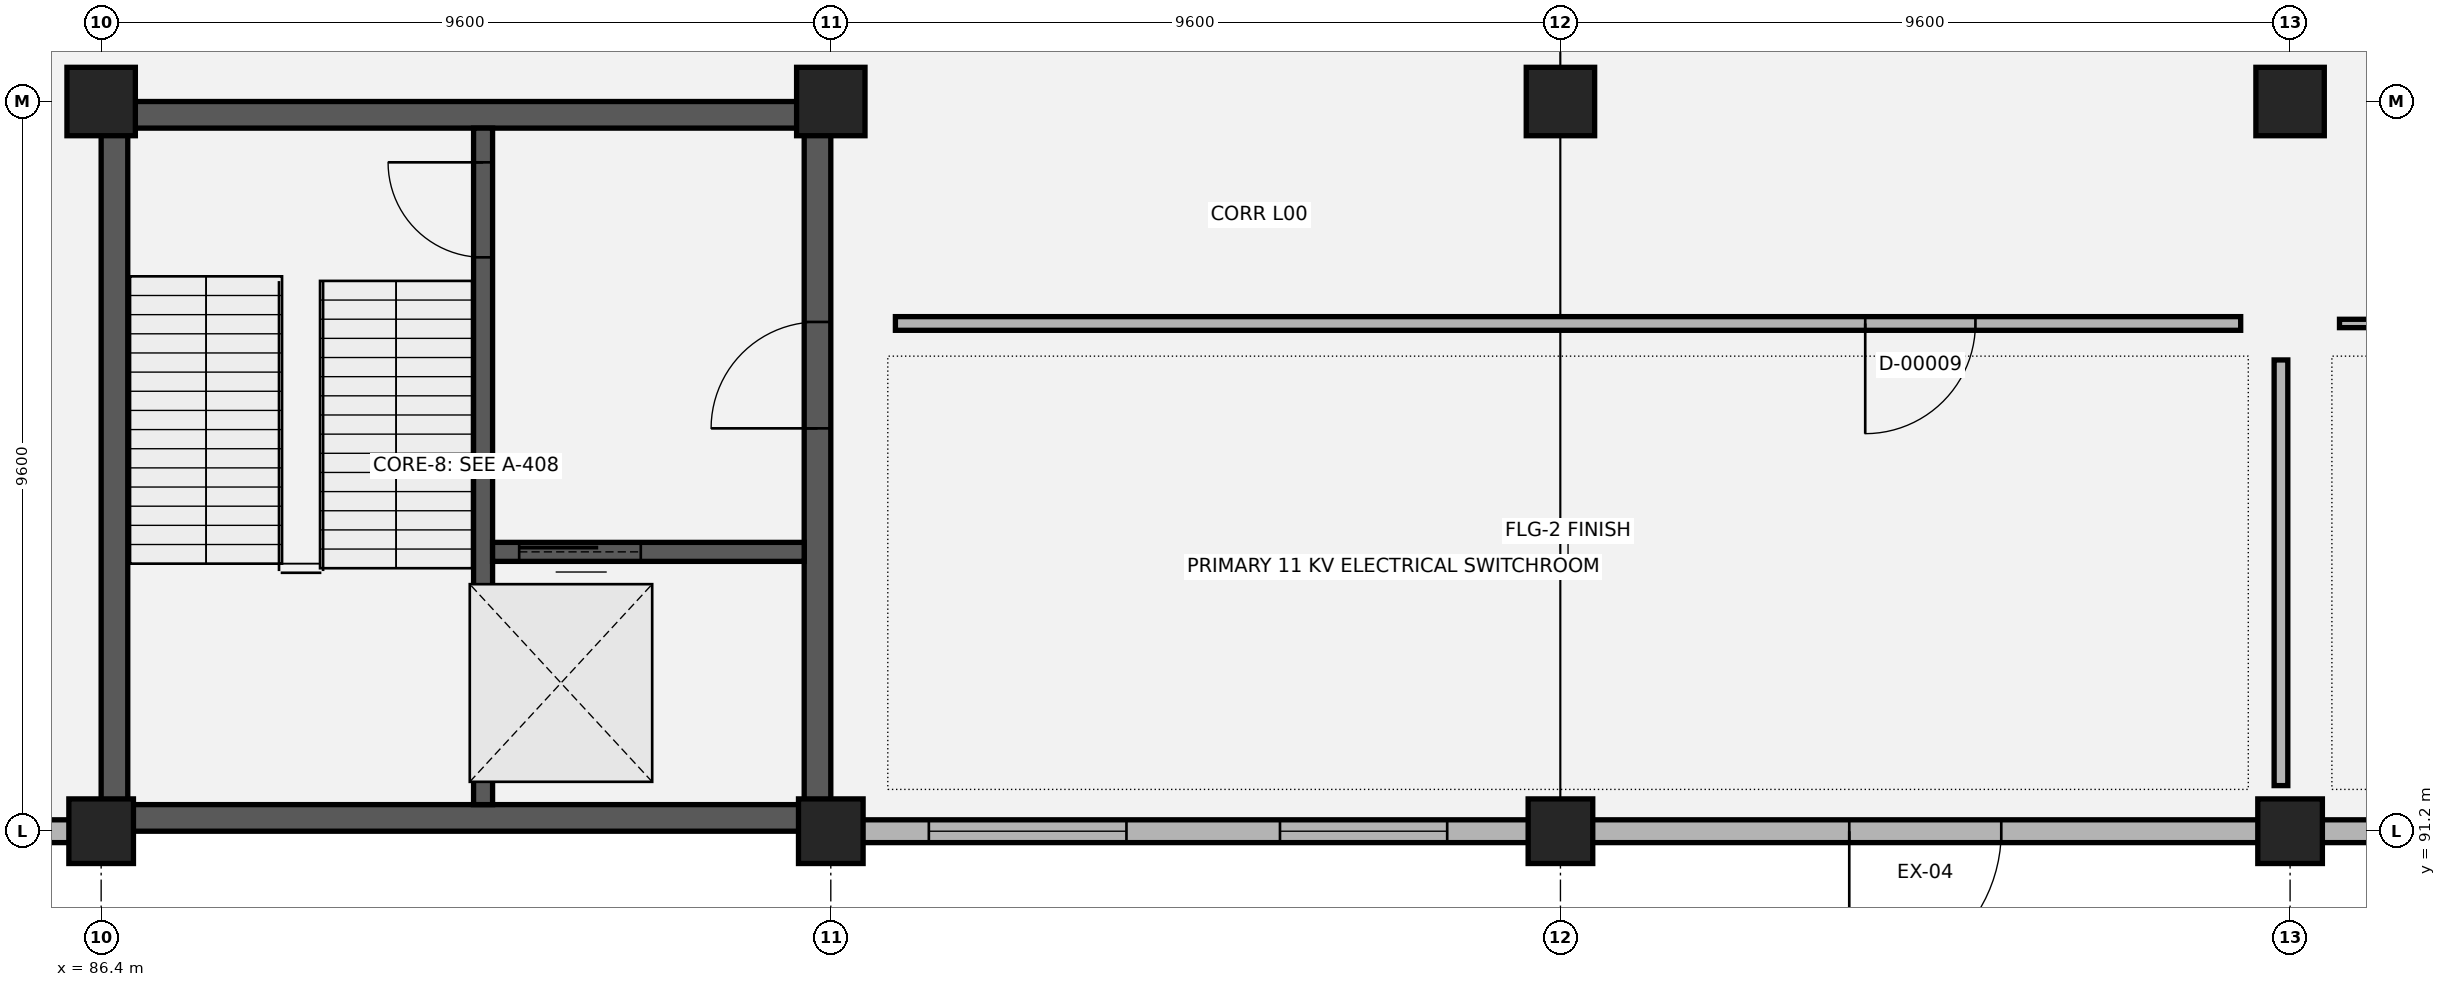
"""IFC4 building model, lengths in metres.
Left out: names, types, materials, properties, quantities, classifications, styles, units other than length and angle.
Written with IfcOpenShell. Run it as: python <this file> out.ifc"""

import sys

from ifc_helpers import new_model, si_unit, direction, frame, frame_2d, origin, origin_2d, place, context, subcontext, project, spatial, rectangle, extrude, element, fill, save


model = new_model("IFC4")
c1 = context("Model", 3, precision=1e-05, world=origin(), true_north=direction((0.0, 1.0)))
c2 = subcontext(c1, "Body", "Model", "MODEL_VIEW")
j1 = project(units=[si_unit("LENGTHUNIT", "METRE"), si_unit("PLANEANGLEUNIT", "RADIAN")], contexts=[c1])
p1 = place(None, origin())
s1 = spatial("IfcSite", under=j1, at=p1, CompositionType="ELEMENT")
p2 = place(p1, origin())
s2 = spatial("IfcBuilding", under=s1, at=p2, CompositionType="ELEMENT")
p3 = place(p2, origin())
s3 = spatial("IfcBuildingStorey", under=s2, at=p3, CompositionType="ELEMENT", Elevation=0.0)
p4 = place(p3, frame((86.4, 91.2, 0.0), z_axis=(0.0, 0.0, 1.0), x_axis=(1.0, 0.0, 0.0)))
e1 = element("IfcColumn", 1, at=p4, inside=s3, PredefinedType="COLUMN", context=c2, shape_type="SweptSolid", body=[
    extrude(rectangle(XDim=0.85, YDim=0.85, at=origin_2d()), origin(), (0.0, 0.0, 1.0), 5.4),
])
p5 = place(p3, frame((86.4, 100.8, 0.0), z_axis=(0.0, 0.0, 1.0), x_axis=(1.0, 0.0, 0.0)))
e2 = element("IfcColumn", 2, at=p5, inside=s3, PredefinedType="COLUMN", context=c2, shape_type="SweptSolid", body=[
    extrude(rectangle(XDim=0.9, YDim=0.9, at=origin_2d()), origin(), (0.0, 0.0, 1.0), 5.4),
])
p6 = place(p3, frame((96.0, 91.2, 0.0), z_axis=(0.0, 0.0, 1.0), x_axis=(1.0, 0.0, 0.0)))
e3 = element("IfcColumn", 3, at=p6, inside=s3, PredefinedType="COLUMN", context=c2, shape_type="SweptSolid", body=[
    extrude(rectangle(XDim=0.85, YDim=0.85, at=origin_2d()), origin(), (0.0, 0.0, 1.0), 5.4),
])
p7 = place(p3, frame((96.0, 100.8, 0.0), z_axis=(0.0, 0.0, 1.0), x_axis=(1.0, 0.0, 0.0)))
e4 = element("IfcColumn", 4, at=p7, inside=s3, PredefinedType="COLUMN", context=c2, shape_type="SweptSolid", body=[
    extrude(rectangle(XDim=0.9, YDim=0.9, at=origin_2d()), origin(), (0.0, 0.0, 1.0), 5.4),
])
p8 = place(p3, frame((105.6, 91.2, 0.0), z_axis=(0.0, 0.0, 1.0), x_axis=(1.0, 0.0, 0.0)))
e5 = element("IfcColumn", 5, at=p8, inside=s3, PredefinedType="COLUMN", context=c2, shape_type="SweptSolid", body=[
    extrude(rectangle(XDim=0.85, YDim=0.85, at=origin_2d()), origin(), (0.0, 0.0, 1.0), 5.4),
])
p9 = place(p3, frame((105.6, 100.8, 0.0), z_axis=(0.0, 0.0, 1.0), x_axis=(1.0, 0.0, 0.0)))
e6 = element("IfcColumn", 6, at=p9, inside=s3, PredefinedType="COLUMN", context=c2, shape_type="SweptSolid", body=[
    extrude(rectangle(XDim=0.9, YDim=0.9, at=origin_2d()), origin(), (0.0, 0.0, 1.0), 5.4),
])
p10 = place(p3, frame((115.2, 91.2, 0.0), z_axis=(0.0, 0.0, 1.0), x_axis=(1.0, 0.0, 0.0)))
e7 = element("IfcColumn", 7, at=p10, inside=s3, PredefinedType="COLUMN", context=c2, shape_type="SweptSolid", body=[
    extrude(rectangle(XDim=0.85, YDim=0.85, at=origin_2d()), origin(), (0.0, 0.0, 1.0), 5.4),
])
p11 = place(p3, frame((115.2, 100.8, 0.0), z_axis=(0.0, 0.0, 1.0), x_axis=(1.0, 0.0, 0.0)))
e8 = element("IfcColumn", 8, at=p11, inside=s3, PredefinedType="COLUMN", context=c2, shape_type="SweptSolid", body=[
    extrude(rectangle(XDim=0.9, YDim=0.9, at=origin_2d()), origin(), (0.0, 0.0, 1.0), 5.4),
])
p12 = place(p3, frame((77.18, 91.2, 0.0), z_axis=(0.0, 0.0, 1.0), x_axis=(1.0, 0.0, 0.0)))
e9 = element("IfcWall", 9, at=p12, inside=s3, PredefinedType="SOLIDWALL", context=c2, shape_type="SweptSolid", body=[
    extrude(rectangle(XDim=8.84, YDim=0.3, at=frame_2d((4.42, 0.0))), origin(), (0.0, 0.0, 1.0), 4.04),
])
p13 = place(p12, frame((0.91, 0.0, 0.9)))
e10 = element("IfcOpeningElement", 10, at=p13, cuts=e9, PredefinedType="OPENING", context=c2, shape_type="SweptSolid", body=[
    extrude(rectangle(XDim=2.6, YDim=1.8, at=frame_2d((1.3, 0.9))), frame((0.0, 0.16, 0.0), z_axis=(0.0, -1.0, 0.0), x_axis=(1.0, 0.0, 0.0)), (0.0, 0.0, 1.0), 0.32),
])
p14 = place(p12, frame((5.53, 0.0, 0.9)))
e11 = element("IfcOpeningElement", 11, at=p14, cuts=e9, PredefinedType="OPENING", context=c2, shape_type="SweptSolid", body=[
    extrude(rectangle(XDim=2.2, YDim=1.8, at=frame_2d((1.1, 0.9))), frame((0.0, 0.16, 0.0), z_axis=(0.0, -1.0, 0.0), x_axis=(1.0, 0.0, 0.0)), (0.0, 0.0, 1.0), 0.32),
])
p15 = place(p3, frame((96.38, 91.2, 0.0), z_axis=(0.0, 0.0, 1.0), x_axis=(1.0, 0.0, 0.0)))
e12 = element("IfcWall", 12, at=p15, inside=s3, PredefinedType="SOLIDWALL", context=c2, shape_type="SweptSolid", body=[
    extrude(rectangle(XDim=8.84, YDim=0.3, at=frame_2d((4.42, 0.0))), origin(), (0.0, 0.0, 1.0), 4.04),
])
p16 = place(p15, frame((0.91, 0.0, 0.9)))
e13 = element("IfcOpeningElement", 13, at=p16, cuts=e12, PredefinedType="OPENING", context=c2, shape_type="SweptSolid", body=[
    extrude(rectangle(XDim=2.6, YDim=1.8, at=frame_2d((1.3, 0.9))), frame((0.0, 0.16, 0.0), z_axis=(0.0, -1.0, 0.0), x_axis=(1.0, 0.0, 0.0)), (0.0, 0.0, 1.0), 0.32),
])
p17 = place(p15, frame((5.53, 0.0, 0.9)))
e14 = element("IfcOpeningElement", 14, at=p17, cuts=e12, PredefinedType="OPENING", context=c2, shape_type="SweptSolid", body=[
    extrude(rectangle(XDim=2.2, YDim=1.8, at=frame_2d((1.1, 0.9))), frame((0.0, 0.16, 0.0), z_axis=(0.0, -1.0, 0.0), x_axis=(1.0, 0.0, 0.0)), (0.0, 0.0, 1.0), 0.32),
])
p18 = place(p3, frame((105.98, 91.2, 0.0), z_axis=(0.0, 0.0, 1.0), x_axis=(1.0, 0.0, 0.0)))
e15 = element("IfcWall", 15, at=p18, inside=s3, PredefinedType="SOLIDWALL", context=c2, shape_type="SweptSolid", body=[
    extrude(rectangle(XDim=8.84, YDim=0.3, at=frame_2d((4.42, 0.0))), origin(), (0.0, 0.0, 1.0), 4.04),
])
p19 = place(p18, frame((3.42, 0.0, 0.0)))
e16 = element("IfcOpeningElement", 16, at=p19, cuts=e15, PredefinedType="OPENING", context=c2, shape_type="SweptSolid", body=[
    extrude(rectangle(XDim=2.0, YDim=2.2, at=frame_2d((1.0, 1.1))), frame((0.0, 0.16, 0.0), z_axis=(0.0, -1.0, 0.0), x_axis=(1.0, 0.0, 0.0)), (0.0, 0.0, 1.0), 0.32),
])
p20 = place(p3, frame((115.58, 91.2, 0.0), z_axis=(0.0, 0.0, 1.0), x_axis=(1.0, 0.0, 0.0)))
e17 = element("IfcWall", 17, at=p20, inside=s3, PredefinedType="SOLIDWALL", context=c2, shape_type="SweptSolid", body=[
    extrude(rectangle(XDim=8.84, YDim=0.3, at=frame_2d((4.42, 0.0))), origin(), (0.0, 0.0, 1.0), 4.04),
])
p21 = place(p20, frame((0.91, 0.0, 0.9)))
e18 = element("IfcOpeningElement", 18, at=p21, cuts=e17, PredefinedType="OPENING", context=c2, shape_type="SweptSolid", body=[
    extrude(rectangle(XDim=2.6, YDim=1.8, at=frame_2d((1.3, 0.9))), frame((0.0, 0.16, 0.0), z_axis=(0.0, -1.0, 0.0), x_axis=(1.0, 0.0, 0.0)), (0.0, 0.0, 1.0), 0.32),
])
p22 = place(p20, frame((5.53, 0.0, 0.9)))
e19 = element("IfcOpeningElement", 19, at=p22, cuts=e17, PredefinedType="OPENING", context=c2, shape_type="SweptSolid", body=[
    extrude(rectangle(XDim=2.2, YDim=1.8, at=frame_2d((1.1, 0.9))), frame((0.0, 0.16, 0.0), z_axis=(0.0, -1.0, 0.0), x_axis=(1.0, 0.0, 0.0)), (0.0, 0.0, 1.0), 0.32),
])
for number, where, z_axis, x_axis in (
    (20, (86.4, 100.625, 0.0), (0.0, 0.0, 1.0), (1.0, 0.0, 0.0)),
    (21, (86.4, 91.375, 0.0), (0.0, 0.0, 1.0), (1.0, 0.0, 0.0)),
    (22, (86.575, 91.2, 0.0), (0.0, 0.0, 1.0), (0.0, 1.0, 0.0)),
):
    element("IfcWall", number, at=place(p3, frame(where, z_axis=z_axis, x_axis=x_axis)), inside=s3, PredefinedType="SHEAR", context=c2, shape_type="SweptSolid", body=[
        extrude(rectangle(XDim=9.6, YDim=0.35, at=frame_2d((4.8, 0.0))), origin(), (0.0, 0.0, 1.0), 5.11),
    ])
p23 = place(p3, frame((95.825, 91.2, 0.0), z_axis=(0.0, 0.0, 1.0), x_axis=(0.0, 1.0, 0.0)))
e23 = element("IfcWall", 23, at=p23, inside=s3, PredefinedType="SHEAR", context=c2, shape_type="SweptSolid", body=[
    extrude(rectangle(XDim=9.6, YDim=0.35, at=frame_2d((4.8, 0.0))), origin(), (0.0, 0.0, 1.0), 5.11),
])
p24 = place(p23, frame((5.3, 0.0, 0.0)))
e24 = element("IfcOpeningElement", 24, at=p24, cuts=e23, PredefinedType="OPENING", context=c2, shape_type="SweptSolid", body=[
    extrude(rectangle(XDim=1.4, YDim=2.15, at=frame_2d((0.7, 1.075))), frame((0.0, 0.185, 0.0), z_axis=(0.0, -1.0, 0.0), x_axis=(1.0, 0.0, 0.0)), (0.0, 0.0, 1.0), 0.37),
])
p25 = place(p3, frame((91.425, 100.45, 0.0), z_axis=(0.0, 0.0, 1.0), x_axis=(0.0, -1.0, 0.0)))
e25 = element("IfcWall", 25, at=p25, inside=s3, PredefinedType="SHEAR", context=c2, shape_type="SweptSolid", body=[
    extrude(rectangle(XDim=8.9, YDim=0.25, at=frame_2d((4.45, 0.0))), origin(), (0.0, 0.0, 1.0), 5.11),
])
p26 = place(p25, frame((0.45, 0.0, 0.0)))
e26 = element("IfcOpeningElement", 26, at=p26, cuts=e25, PredefinedType="OPENING", context=c2, shape_type="SweptSolid", body=[
    extrude(rectangle(XDim=1.25, YDim=2.15, at=frame_2d((0.625, 1.075))), frame((0.0, 0.135, 0.0), z_axis=(0.0, -1.0, 0.0), x_axis=(1.0, 0.0, 0.0)), (0.0, 0.0, 1.0), 0.27),
])
p27 = place(p3, frame((91.55, 94.875, 0.0), z_axis=(0.0, 0.0, 1.0), x_axis=(1.0, 0.0, 0.0)))
e27 = element("IfcWall", 27, at=p27, inside=s3, PredefinedType="SHEAR", context=c2, shape_type="SweptSolid", body=[
    extrude(rectangle(XDim=4.1, YDim=0.25, at=frame_2d((2.05, 0.0))), origin(), (0.0, 0.0, 1.0), 5.11),
])
p28 = place(p27, frame((0.35, 0.0, 0.0)))
e28 = element("IfcOpeningElement", 28, at=p28, cuts=e27, PredefinedType="OPENING", context=c2, shape_type="SweptSolid", body=[
    extrude(rectangle(XDim=1.6, YDim=2.2, at=frame_2d((0.8, 1.1))), frame((0.0, 0.135, 0.0), z_axis=(0.0, -1.0, 0.0), x_axis=(1.0, 0.0, 0.0)), (0.0, 0.0, 1.0), 0.27),
])
p29 = place(p3, frame((96.85, 97.88, 0.0), z_axis=(0.0, 0.0, 1.0), x_axis=(1.0, 0.0, 0.0)))
e29 = element("IfcWall", 29, at=p29, inside=s3, PredefinedType="PARTITIONING", context=c2, shape_type="SweptSolid", body=[
    extrude(rectangle(XDim=17.7, YDim=0.18, at=frame_2d((8.85, 0.0))), origin(), (0.0, 0.0, 1.0), 4.04),
])
p30 = place(p29, frame((12.76, 0.0, 0.0)))
e30 = element("IfcOpeningElement", 30, at=p30, cuts=e29, PredefinedType="OPENING", context=c2, shape_type="SweptSolid", body=[
    extrude(rectangle(XDim=1.45, YDim=2.15, at=frame_2d((0.725, 1.075))), frame((0.0, 0.1, 0.0), z_axis=(0.0, -1.0, 0.0), x_axis=(1.0, 0.0, 0.0)), (0.0, 0.0, 1.0), 0.2),
])
p31 = place(p3, frame((115.08, 91.8, 0.0), z_axis=(0.0, 0.0, 1.0), x_axis=(0.0, 1.0, 0.0)))
e31 = element("IfcWall", 31, at=p31, inside=s3, PredefinedType="PARTITIONING", context=c2, shape_type="SweptSolid", body=[
    extrude(rectangle(XDim=5.6, YDim=0.18, at=frame_2d((2.8, 0.0))), origin(), (0.0, 0.0, 1.0), 4.04),
])
p32 = place(p3, frame((115.85, 97.88, 0.0), z_axis=(0.0, 0.0, 1.0), x_axis=(1.0, 0.0, 0.0)))
e32 = element("IfcWall", 32, at=p32, inside=s3, PredefinedType="PARTITIONING", context=c2, shape_type="SweptSolid", body=[
    extrude(rectangle(XDim=8.1, YDim=0.11, at=frame_2d((4.05, 0.0))), origin(), (0.0, 0.0, 1.0), 4.04),
])
p33 = place(p32, frame((1.277, 0.0, 0.0)))
e33 = element("IfcOpeningElement", 33, at=p33, cuts=e32, PredefinedType="OPENING", context=c2, shape_type="SweptSolid", body=[
    extrude(rectangle(XDim=1.45, YDim=2.15, at=frame_2d((0.725, 1.075))), frame((0.0, 0.065, 0.0), z_axis=(0.0, -1.0, 0.0), x_axis=(1.0, 0.0, 0.0)), (0.0, 0.0, 1.0), 0.13),
])
p34 = place(p16, origin())
e34 = element("IfcWindow", 34, at=p34, inside=s3, PartitioningType="SINGLE_PANEL", PredefinedType="WINDOW", context=c2, shape_type="SweptSolid", body=[
    extrude(rectangle(XDim=2.6, YDim=1.8, at=frame_2d((1.3, 0.9))), frame((0.0, 0.03, 0.0), z_axis=(0.0, -1.0, 0.0), x_axis=(1.0, 0.0, 0.0)), (0.0, 0.0, 1.0), 0.06),
])
fill(e13, e34)
p35 = place(p17, origin())
e35 = element("IfcWindow", 35, at=p35, inside=s3, PartitioningType="SINGLE_PANEL", PredefinedType="WINDOW", context=c2, shape_type="SweptSolid", body=[
    extrude(rectangle(XDim=2.2, YDim=1.8, at=frame_2d((1.1, 0.9))), frame((0.0, 0.03, 0.0), z_axis=(0.0, -1.0, 0.0), x_axis=(1.0, 0.0, 0.0)), (0.0, 0.0, 1.0), 0.06),
])
fill(e14, e35)
p36 = place(p19, origin())
e36 = element("IfcDoor", 36, at=p36, inside=s3, OperationType="SINGLE_SWING_RIGHT", PredefinedType="DOOR", context=c2, shape_type="SweptSolid", body=[
    extrude(rectangle(XDim=2.0, YDim=2.2, at=frame_2d((1.0, 1.1))), frame((0.0, 0.025, 0.0), z_axis=(0.0, -1.0, 0.0), x_axis=(1.0, 0.0, 0.0)), (0.0, 0.0, 1.0), 0.05),
])
fill(e16, e36)
p37 = place(p26, origin())
e37 = element("IfcDoor", 37, at=p37, inside=s3, OperationType="SINGLE_SWING_RIGHT", PredefinedType="DOOR", context=c2, shape_type="SweptSolid", body=[
    extrude(rectangle(XDim=1.25, YDim=2.15, at=frame_2d((0.625, 1.075))), frame((0.0, 0.025, 0.0), z_axis=(0.0, -1.0, 0.0), x_axis=(1.0, 0.0, 0.0)), (0.0, 0.0, 1.0), 0.05),
])
fill(e26, e37)
p38 = place(p28, origin())
e38 = element("IfcDoor", 38, at=p38, inside=s3, OperationType="SLIDING_TO_LEFT", PredefinedType="DOOR", context=c2, shape_type="SweptSolid", body=[
    extrude(rectangle(XDim=1.6, YDim=2.2, at=frame_2d((0.8, 1.1))), frame((0.0, 0.025, 0.0), z_axis=(0.0, -1.0, 0.0), x_axis=(1.0, 0.0, 0.0)), (0.0, 0.0, 1.0), 0.05),
])
fill(e28, e38)
p39 = place(p24, origin())
e39 = element("IfcDoor", 39, at=p39, inside=s3, OperationType="SINGLE_SWING_LEFT", PredefinedType="DOOR", context=c2, shape_type="SweptSolid", body=[
    extrude(rectangle(XDim=1.4, YDim=2.15, at=frame_2d((0.7, 1.075))), frame((0.0, 0.025, 0.0), z_axis=(0.0, -1.0, 0.0), x_axis=(1.0, 0.0, 0.0)), (0.0, 0.0, 1.0), 0.05),
])
fill(e24, e39)
p40 = place(p30, origin())
e40 = element("IfcDoor", 40, at=p40, inside=s3, OperationType="SINGLE_SWING_RIGHT", PredefinedType="DOOR", context=c2, shape_type="SweptSolid", body=[
    extrude(rectangle(XDim=1.45, YDim=2.15, at=frame_2d((0.725, 1.075))), frame((0.0, 0.025, 0.0), z_axis=(0.0, -1.0, 0.0), x_axis=(1.0, 0.0, 0.0)), (0.0, 0.0, 1.0), 0.05),
])
fill(e30, e40)
save(model, sys.argv[1])
